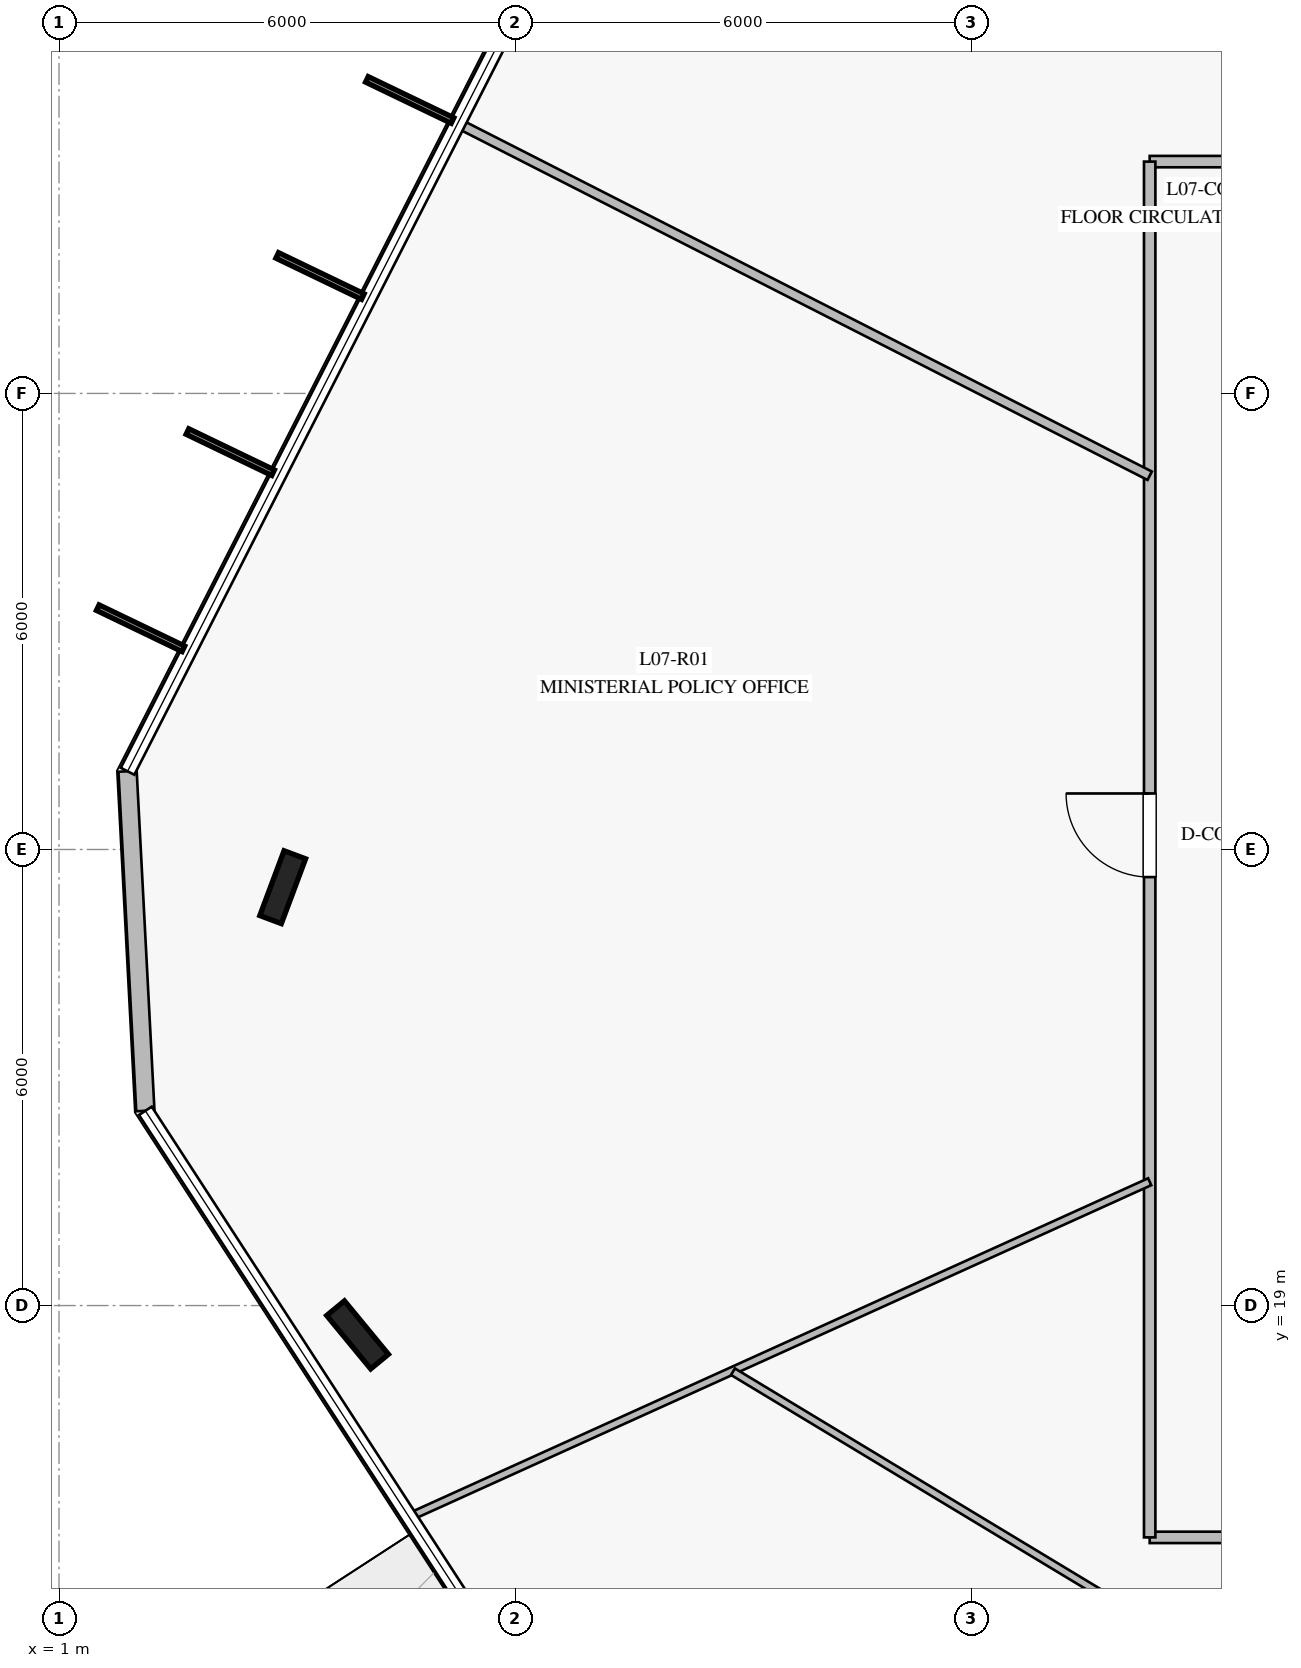
"""IFC4 building model, lengths in metres.
Left out: names, types, materials, properties, quantities, classifications, styles, units other than length and angle.
Written with IfcOpenShell. Run it as: python <this file> out.ifc"""

import sys

from ifc_helpers import new_model, si_unit, direction, frame, frame_2d, origin, origin_2d, place, context, subcontext, project, spatial, rectangle, i_section, extrude, element, fill, save


model = new_model("IFC4")
c1 = context("Model", 3, precision=1e-05, world=origin(), true_north=direction((0.0, 1.0)))
c2 = subcontext(c1, "Body", "Model", "MODEL_VIEW")
j1 = project(units=[si_unit("LENGTHUNIT", "METRE"), si_unit("PLANEANGLEUNIT", "RADIAN")], contexts=[c1])
p1 = place(None, origin())
s1 = spatial("IfcSite", under=j1, at=p1, CompositionType="ELEMENT")
p2 = place(p1, origin())
s2 = spatial("IfcBuilding", under=s1, at=p2, CompositionType="ELEMENT")
p3 = place(p2, frame((0.0, 0.0, 32.0)))
s3 = spatial("IfcBuildingStorey", under=s2, at=p3, CompositionType="ELEMENT", Elevation=32.0)
for number, where, z_axis, x_axis in (
    (1, (3.943, 24.504, 0.0), (0.0, 0.0, 1.0), (0.35, 0.937, 0.0)),
    (2, (4.928, 18.614, 0.0), (0.0, 0.0, 1.0), (-0.636, 0.772, 0.0)),
):
    element("IfcColumn", number, at=place(p3, frame(where, z_axis=z_axis, x_axis=x_axis)), inside=s3, PredefinedType="COLUMN", context=c2, shape_type="SweptSolid", body=[
        extrude(i_section(OverallWidth=0.302, OverallDepth=0.91, WebThickness=0.021, FlangeThickness=0.04, at=origin_2d()), origin(), (0.0, 0.0, 1.0), 4.0),
    ])
p4 = place(p3, frame((1.902, 26.029, 0.0), z_axis=(0.0, 0.0, 1.0), x_axis=(0.052286689983, -0.998632115471, 0.0)))
e3 = element("IfcWall", 3, at=p4, inside=s3, PredefinedType="STANDARD", context=c2, shape_type="SweptSolid", body=[
    extrude(rectangle(XDim=4.473, YDim=0.24, at=frame_2d((2.237, 0.0))), origin(), (0.0, 0.0, 1.0), 3.76),
])
p5 = place(p3, frame((15.35, 34.05, 0.0), z_axis=(0.0, 0.0, 1.0), x_axis=(1.0, 0.0, 0.0)))
e4 = element("IfcWall", 4, at=p5, inside=s3, PredefinedType="PARTITIONING", context=c2, shape_type="SweptSolid", body=[
    extrude(rectangle(XDim=19.3, YDim=0.15, at=frame_2d((9.65, 0.0))), origin(), (0.0, 0.0, 1.0), 3.21),
])
p6 = place(p5, frame((12.519, 0.0, 0.0)))
e5 = element("IfcOpeningElement", 5, at=p6, cuts=e4, PredefinedType="OPENING", context=c2, shape_type="SweptSolid", body=[
    extrude(rectangle(XDim=1.1, YDim=2.2, at=frame_2d((0.55, 1.1))), frame((0.0, 0.085, 0.0), z_axis=(0.0, -1.0, 0.0), x_axis=(1.0, 0.0, 0.0)), (0.0, 0.0, 1.0), 0.17),
])
p7 = place(p5, frame((3.519, 0.0, 0.0)))
e6 = element("IfcOpeningElement", 6, at=p7, cuts=e4, PredefinedType="OPENING", context=c2, shape_type="SweptSolid", body=[
    extrude(rectangle(XDim=1.1, YDim=2.2, at=frame_2d((0.55, 1.1))), frame((0.0, 0.085, 0.0), z_axis=(0.0, -1.0, 0.0), x_axis=(1.0, 0.0, 0.0)), (0.0, 0.0, 1.0), 0.17),
])
p8 = place(p3, frame((34.65, 15.95, 0.0), z_axis=(0.0, 0.0, 1.0), x_axis=(-1.0, 0.0, 0.0)))
e7 = element("IfcWall", 7, at=p8, inside=s3, PredefinedType="PARTITIONING", context=c2, shape_type="SweptSolid", body=[
    extrude(rectangle(XDim=19.3, YDim=0.15, at=frame_2d((9.65, 0.0))), origin(), (0.0, 0.0, 1.0), 3.21),
])
p9 = place(p8, frame((14.102, 0.0, 0.0)))
e8 = element("IfcOpeningElement", 8, at=p9, cuts=e7, PredefinedType="OPENING", context=c2, shape_type="SweptSolid", body=[
    extrude(rectangle(XDim=1.1, YDim=2.2, at=frame_2d((0.55, 1.1))), frame((0.0, 0.085, 0.0), z_axis=(0.0, -1.0, 0.0), x_axis=(1.0, 0.0, 0.0)), (0.0, 0.0, 1.0), 0.17),
])
p10 = place(p8, frame((4.818, 0.0, 0.0)))
e9 = element("IfcOpeningElement", 9, at=p10, cuts=e7, PredefinedType="OPENING", context=c2, shape_type="SweptSolid", body=[
    extrude(rectangle(XDim=1.1, YDim=2.2, at=frame_2d((0.55, 1.1))), frame((0.0, 0.085, 0.0), z_axis=(0.0, -1.0, 0.0), x_axis=(1.0, 0.0, 0.0)), (0.0, 0.0, 1.0), 0.17),
])
p11 = place(p3, frame((15.35, 15.95, 0.0), z_axis=(0.0, 0.0, 1.0), x_axis=(0.0, 1.0, 0.0)))
e10 = element("IfcWall", 10, at=p11, inside=s3, PredefinedType="PARTITIONING", context=c2, shape_type="SweptSolid", body=[
    extrude(rectangle(XDim=18.1, YDim=0.15, at=frame_2d((9.05, 0.0))), origin(), (0.0, 0.0, 1.0), 3.21),
])
p12 = place(p11, frame((8.687, 0.0, 0.0)))
e11 = element("IfcOpeningElement", 11, at=p12, cuts=e10, PredefinedType="OPENING", context=c2, shape_type="SweptSolid", body=[
    extrude(rectangle(XDim=1.1, YDim=2.2, at=frame_2d((0.55, 1.1))), frame((0.0, 0.085, 0.0), z_axis=(0.0, -1.0, 0.0), x_axis=(1.0, 0.0, 0.0)), (0.0, 0.0, 1.0), 0.17),
])
p13 = place(p3, frame((15.35, 29.917, 0.0), z_axis=(0.0, 0.0, 1.0), x_axis=(-0.891026709761, 0.453950881145, 0.0)))
e12 = element("IfcWall", 12, at=p13, inside=s3, PredefinedType="PARTITIONING", context=c2, shape_type="SweptSolid", body=[
    extrude(rectangle(XDim=10.2, YDim=0.125, at=frame_2d((5.1, 0.0))), origin(), (0.0, 0.0, 1.0), 3.02),
])
p14 = place(p3, frame((15.35, 20.629, 0.0), z_axis=(0.0, 0.0, 1.0), x_axis=(-0.910935697365, -0.412548367184, 0.0)))
e13 = element("IfcWall", 13, at=p14, inside=s3, PredefinedType="MOVABLE", context=c2, shape_type="SweptSolid", body=[
    extrude(rectangle(XDim=10.677, YDim=0.1, at=frame_2d((5.338, 0.0))), origin(), (0.0, 0.0, 1.0), 3.05),
])
p15 = place(p3, frame((9.867, 18.13, 0.0), z_axis=(0.0, 0.0, 1.0), x_axis=(0.856231759505, -0.516591883419, 0.0)))
e14 = element("IfcWall", 14, at=p15, inside=s3, PredefinedType="MOVABLE", context=c2, shape_type="SweptSolid", body=[
    extrude(rectangle(XDim=15.917, YDim=0.1, at=frame_2d((7.959, 0.0))), origin(), (0.0, 0.0, 1.0), 3.05),
])
p16 = place(p15, frame((7.459, 0.0, 0.0)))
e15 = element("IfcOpeningElement", 15, at=p16, cuts=e14, PredefinedType="OPENING", context=c2, shape_type="SweptSolid", body=[
    extrude(rectangle(XDim=1.0, YDim=2.15, at=frame_2d((0.5, 1.075))), frame((0.0, 0.06, 0.0), z_axis=(0.0, -1.0, 0.0), x_axis=(1.0, 0.0, 0.0)), (0.0, 0.0, 1.0), 0.12),
])
p17 = place(p12, origin())
e16 = element("IfcDoor", 16, at=p17, inside=s3, OperationType="SINGLE_SWING_RIGHT", PredefinedType="DOOR", context=c2, shape_type="SweptSolid", body=[
    extrude(rectangle(XDim=1.1, YDim=2.2, at=frame_2d((0.55, 1.1))), frame((0.0, 0.025, 0.0), z_axis=(0.0, -1.0, 0.0), x_axis=(1.0, 0.0, 0.0)), (0.0, 0.0, 1.0), 0.05),
])
fill(e11, e16)
save(model, sys.argv[1])
